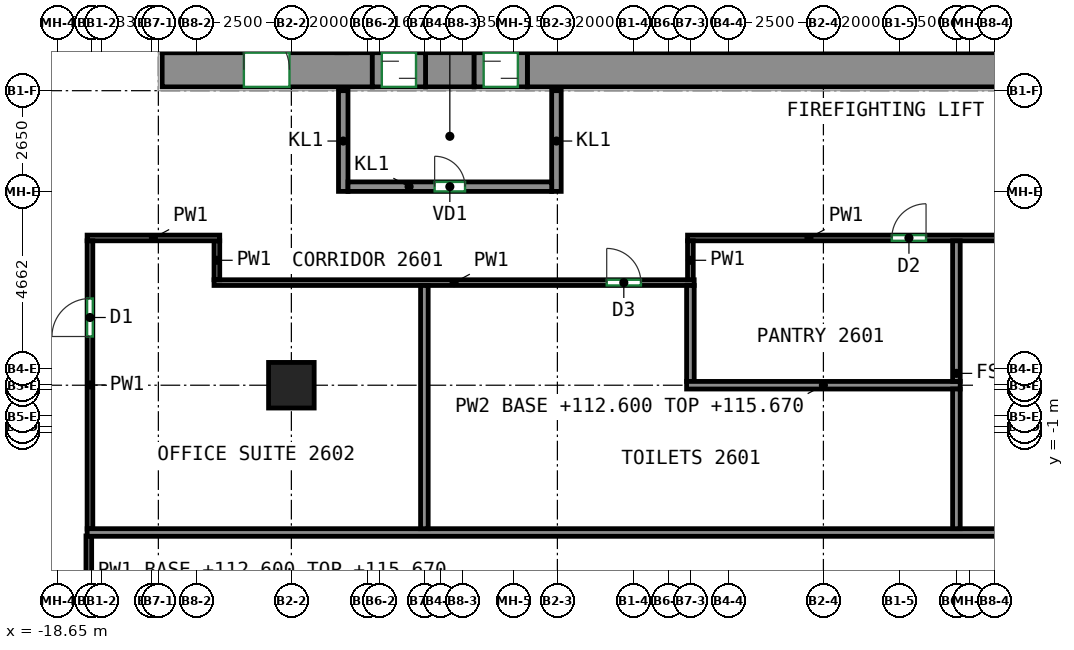
"""IFC4 building model, lengths in metres.
Left out: names, types, materials, properties, quantities, classifications, styles, units other than length and angle.
Written with IfcOpenShell. Run it as: python <this file> out.ifc"""

import sys

from ifc_helpers import new_model, si_unit, direction, frame, frame_2d, origin, origin_2d, place, context, subcontext, project, spatial, rectangle, extrude, source, transform, mapped, element, fill, save


model = new_model("IFC4")
c1 = context("Model", 3, precision=1e-05, world=origin(), true_north=direction((0.0, 1.0)))
c2 = subcontext(c1, "Body", "Model", "MODEL_VIEW")
j1 = project(units=[si_unit("LENGTHUNIT", "METRE"), si_unit("PLANEANGLEUNIT", "RADIAN")], contexts=[c1])
p1 = place(None, origin())
s1 = spatial("IfcSite", under=j1, at=p1, CompositionType="ELEMENT")
p2 = place(p1, origin())
s2 = spatial("IfcBuilding", under=s1, at=p2, CompositionType="ELEMENT")
p3 = place(p2, frame((0.0, 0.0, 112.6)))
s3 = spatial("IfcBuildingStorey", under=s2, at=p3, CompositionType="ELEMENT", Elevation=112.6)
m1 = source(origin(), c2, "Body", "SweptSolid", [
    extrude(rectangle(XDim=1.2, YDim=1.2, at=origin_2d()), origin(), (0.0, 0.0, 1.0), 3.72),
])
p4 = place(p3, frame((-12.5, 0.25, 0.0), z_axis=(0.0, 0.0, 1.0), x_axis=(1.0, 0.0, 0.0)))
e1 = element("IfcColumn", 1, at=p4, inside=s3, PredefinedType="COLUMN", context=c2, shape_type="MappedRepresentation", body=[
    mapped(m1, transform((0.0, 0.0, 0.0))),
])
m2 = source(origin(), c2, "Body", "SweptSolid", [
    extrude(rectangle(XDim=5.53, YDim=0.9, at=frame_2d((2.765, 0.0))), origin(), (0.0, 0.0, 1.0), 3.72),
])
p5 = place(p3, frame((-15.9, 8.55, 0.0), z_axis=(0.0, 0.0, 1.0), x_axis=(1.0, 0.0, 0.0)))
e2 = element("IfcWall", 2, at=p5, inside=s3, PredefinedType="SHEAR", context=c2, shape_type="MappedRepresentation", body=[
    mapped(m2, transform((0.0, 0.0, 0.0))),
])
p6 = place(p5, frame((2.15, 0.0, 0.0)))
e3 = element("IfcOpeningElement", 3, at=p6, cuts=e2, PredefinedType="OPENING", context=c2, shape_type="SweptSolid", body=[
    extrude(rectangle(XDim=1.2, YDim=2.1, at=frame_2d((0.6, 1.05))), frame((0.0, 0.46, 0.0), z_axis=(0.0, -1.0, 0.0), x_axis=(1.0, 0.0, 0.0)), (0.0, 0.0, 1.0), 0.92),
])
m3 = source(origin(), c2, "Body", "SweptSolid", [
    extrude(rectangle(XDim=1.28, YDim=0.9, at=frame_2d((0.64, 0.0))), origin(), (0.0, 0.0, 1.0), 3.72),
])
p7 = place(p3, frame((-8.97, 8.55, 0.0), z_axis=(0.0, 0.0, 1.0), x_axis=(1.0, 0.0, 0.0)))
e4 = element("IfcWall", 4, at=p7, inside=s3, PredefinedType="SHEAR", context=c2, shape_type="MappedRepresentation", body=[
    mapped(m3, transform((0.0, 0.0, 0.0))),
])
m4 = source(origin(), c2, "Body", "SweptSolid", [
    extrude(rectangle(XDim=14.18, YDim=0.9, at=frame_2d((7.09, 0.0))), origin(), (0.0, 0.0, 1.0), 3.72),
])
p8 = place(p3, frame((-6.29, 8.55, 0.0), z_axis=(0.0, 0.0, 1.0), x_axis=(1.0, 0.0, 0.0)))
e5 = element("IfcWall", 5, at=p8, inside=s3, PredefinedType="SHEAR", context=c2, shape_type="MappedRepresentation", body=[
    mapped(m4, transform((0.0, 0.0, 0.0))),
])
m5 = source(origin(), c2, "Body", "SweptSolid", [
    extrude(rectangle(XDim=2.65, YDim=0.25, at=frame_2d((1.325, 0.0))), origin(), (0.0, 0.0, 1.0), 3.72),
])
for number, where, z_axis, x_axis in (
    (6, (-11.135, 5.35, 0.0), (0.0, 0.0, 1.0), (0.0, 1.0, 0.0)),
    (7, (-5.525, 5.35, 0.0), (0.0, 0.0, 1.0), (0.0, 1.0, 0.0)),
):
    element("IfcWall", number, at=place(p3, frame(where, z_axis=z_axis, x_axis=x_axis)), inside=s3, PredefinedType="PARTITIONING", context=c2, shape_type="MappedRepresentation", body=[
        mapped(m5, transform((0.0, 0.0, 0.0))),
    ])
m6 = source(origin(), c2, "Body", "SweptSolid", [
    extrude(rectangle(XDim=5.36, YDim=0.25, at=frame_2d((2.68, 0.0))), origin(), (0.0, 0.0, 1.0), 3.72),
])
p9 = place(p3, frame((-11.01, 5.475, 0.0), z_axis=(0.0, 0.0, 1.0), x_axis=(1.0, 0.0, 0.0)))
e8 = element("IfcWall", 8, at=p9, inside=s3, PredefinedType="PARTITIONING", context=c2, shape_type="MappedRepresentation", body=[
    mapped(m6, transform((0.0, 0.0, 0.0))),
])
p10 = place(p9, frame((2.28, 0.0, 0.0)))
e9 = element("IfcOpeningElement", 9, at=p10, cuts=e8, PredefinedType="OPENING", context=c2, shape_type="SweptSolid", body=[
    extrude(rectangle(XDim=0.8, YDim=2.0, at=frame_2d((0.4, 1.0))), frame((0.0, 0.135, 0.0), z_axis=(0.0, -1.0, 0.0), x_axis=(1.0, 0.0, 0.0)), (0.0, 0.0, 1.0), 0.27),
])
m7 = source(origin(), c2, "Body", "SweptSolid", [
    extrude(rectangle(XDim=1.4, YDim=0.9, at=frame_2d((0.7, 0.0))), origin(), (0.0, 0.0, 1.0), 2.7),
])
p11 = place(p3, frame((-10.37, 8.55, 0.0), z_axis=(0.0, 0.0, 1.0), x_axis=(1.0, 0.0, 0.0)))
e10 = element("IfcWall", 10, at=p11, inside=s3, PredefinedType="PARTITIONING", context=c2, shape_type="MappedRepresentation", body=[
    mapped(m7, transform((0.0, 0.0, 0.0))),
])
p12 = place(p11, frame((0.25, 0.0, 0.0)))
e11 = element("IfcOpeningElement", 11, at=p12, cuts=e10, PredefinedType="OPENING", context=c2, shape_type="SweptSolid", body=[
    extrude(rectangle(XDim=0.9, YDim=2.1, at=frame_2d((0.45, 1.05))), frame((0.0, 0.46, 0.0), z_axis=(0.0, -1.0, 0.0), x_axis=(1.0, 0.0, 0.0)), (0.0, 0.0, 1.0), 0.92),
])
m8 = source(origin(), c2, "Body", "SweptSolid", [
    extrude(rectangle(XDim=1.4, YDim=0.9, at=frame_2d((0.7, 0.0))), origin(), (0.0, 0.0, 1.0), 2.7),
])
p13 = place(p3, frame((-7.69, 8.55, 0.0), z_axis=(0.0, 0.0, 1.0), x_axis=(1.0, 0.0, 0.0)))
e12 = element("IfcWall", 12, at=p13, inside=s3, PredefinedType="PARTITIONING", context=c2, shape_type="MappedRepresentation", body=[
    mapped(m8, transform((0.0, 0.0, 0.0))),
])
p14 = place(p13, frame((0.25, 0.0, 0.0)))
e13 = element("IfcOpeningElement", 13, at=p14, cuts=e12, PredefinedType="OPENING", context=c2, shape_type="SweptSolid", body=[
    extrude(rectangle(XDim=0.9, YDim=2.1, at=frame_2d((0.45, 1.05))), frame((0.0, 0.46, 0.0), z_axis=(0.0, -1.0, 0.0), x_axis=(1.0, 0.0, 0.0)), (0.0, 0.0, 1.0), 0.92),
])
p15 = place(p3, frame((-14.535, 2.95, 0.0), z_axis=(0.0, 0.0, 1.0), x_axis=(1.0, 0.0, 0.0)))
e14 = element("IfcWall", 14, at=p15, inside=s3, PredefinedType="PARTITIONING", context=c2, shape_type="SweptSolid", body=[
    extrude(rectangle(XDim=12.635, YDim=0.15, at=frame_2d((6.317, 0.0))), origin(), (0.0, 0.0, 1.0), 3.72),
])
p16 = place(p15, frame((10.333, 0.0, 0.0)))
e15 = element("IfcOpeningElement", 15, at=p16, cuts=e14, PredefinedType="OPENING", context=c2, shape_type="SweptSolid", body=[
    extrude(rectangle(XDim=0.9, YDim=2.1, at=frame_2d((0.45, 1.05))), frame((0.0, 0.085, 0.0), z_axis=(0.0, -1.0, 0.0), x_axis=(1.0, 0.0, 0.0)), (0.0, 0.0, 1.0), 0.17),
])
p17 = place(p3, frame((-14.46, 4.05, 0.0), z_axis=(0.0, 0.0, 1.0), x_axis=(0.0, -1.0, 0.0)))
e16 = element("IfcWall", 16, at=p17, inside=s3, PredefinedType="PARTITIONING", context=c2, shape_type="SweptSolid", body=[
    extrude(rectangle(XDim=1.025, YDim=0.15, at=frame_2d((0.513, 0.0))), origin(), (0.0, 0.0, 1.0), 3.72),
])
p18 = place(p3, frame((-17.875, 4.125, 0.0), z_axis=(0.0, 0.0, 1.0), x_axis=(1.0, 0.0, 0.0)))
e17 = element("IfcWall", 17, at=p18, inside=s3, PredefinedType="PARTITIONING", context=c2, shape_type="SweptSolid", body=[
    extrude(rectangle(XDim=3.49, YDim=0.15, at=frame_2d((1.745, 0.0))), origin(), (0.0, 0.0, 1.0), 3.72),
])
p19 = place(p3, frame((-17.8, -3.535, 0.0), z_axis=(0.0, 0.0, 1.0), x_axis=(0.0, 1.0, 0.0)))
e18 = element("IfcWall", 18, at=p19, inside=s3, PredefinedType="PARTITIONING", context=c2, shape_type="SweptSolid", body=[
    extrude(rectangle(XDim=7.585, YDim=0.15, at=frame_2d((3.792, 0.0))), origin(), (0.0, 0.0, 1.0), 3.72),
])
p20 = place(p19, frame((5.067, 0.0, 0.0)))
e19 = element("IfcOpeningElement", 19, at=p20, cuts=e18, PredefinedType="OPENING", context=c2, shape_type="SweptSolid", body=[
    extrude(rectangle(XDim=1.0, YDim=2.1, at=frame_2d((0.5, 1.05))), frame((0.0, 0.085, 0.0), z_axis=(0.0, -1.0, 0.0), x_axis=(1.0, 0.0, 0.0)), (0.0, 0.0, 1.0), 0.17),
])
p21 = place(p3, frame((-17.83, -15.675, 0.0), z_axis=(0.0, 0.0, 1.0), x_axis=(0.0, 1.0, 0.0)))
e20 = element("IfcWall", 20, at=p21, inside=s3, PredefinedType="PARTITIONING", context=c2, shape_type="SweptSolid", body=[
    extrude(rectangle(XDim=11.96, YDim=0.15, at=frame_2d((5.98, 0.0))), origin(), (0.0, 0.0, 1.0), 3.72),
])
p22 = place(p21, frame((8.249, 0.0, 0.0)))
e21 = element("IfcOpeningElement", 21, at=p22, cuts=e20, PredefinedType="OPENING", context=c2, shape_type="SweptSolid", body=[
    extrude(rectangle(XDim=1.8, YDim=2.1, at=frame_2d((0.9, 1.05))), frame((0.0, 0.085, 0.0), z_axis=(0.0, -1.0, 0.0), x_axis=(1.0, 0.0, 0.0)), (0.0, 0.0, 1.0), 0.17),
])
p23 = place(p3, frame((-2.075, 4.125, 0.0), z_axis=(0.0, 0.0, 1.0), x_axis=(1.0, 0.0, 0.0)))
e22 = element("IfcWall", 22, at=p23, inside=s3, PredefinedType="PARTITIONING", context=c2, shape_type="SweptSolid", body=[
    extrude(rectangle(XDim=10.65, YDim=0.15, at=frame_2d((5.325, 0.0))), origin(), (0.0, 0.0, 1.0), 3.72),
])
p24 = place(p23, frame((5.376, 0.0, 0.0)))
e23 = element("IfcOpeningElement", 23, at=p24, cuts=e22, PredefinedType="OPENING", context=c2, shape_type="SweptSolid", body=[
    extrude(rectangle(XDim=0.9, YDim=2.1, at=frame_2d((0.45, 1.05))), frame((0.0, 0.085, 0.0), z_axis=(0.0, -1.0, 0.0), x_axis=(1.0, 0.0, 0.0)), (0.0, 0.0, 1.0), 0.17),
])
p25 = place(p3, frame((-2.0, 3.025, 0.0), z_axis=(0.0, 0.0, 1.0), x_axis=(0.0, 1.0, 0.0)))
e24 = element("IfcWall", 24, at=p25, inside=s3, PredefinedType="PARTITIONING", context=c2, shape_type="SweptSolid", body=[
    extrude(rectangle(XDim=1.025, YDim=0.15, at=frame_2d((0.513, 0.0))), origin(), (0.0, 0.0, 1.0), 3.72),
])
p26 = place(p3, frame((-17.874, -3.625, 0.0), z_axis=(0.0, 0.0, 1.0), x_axis=(1.0, 0.0, 0.0)))
e25 = element("IfcWall", 25, at=p26, inside=s3, PredefinedType="PARTITIONING", context=c2, shape_type="SweptSolid", body=[
    extrude(rectangle(XDim=33.474, YDim=0.2, at=frame_2d((16.737, 0.0))), origin(), (0.0, 0.0, 1.0), 3.72),
])
p27 = place(p3, frame((-9.0, -3.525, 0.0), z_axis=(0.0, 0.0, 1.0), x_axis=(0.0, 1.0, 0.0)))
e26 = element("IfcWall", 26, at=p27, inside=s3, PredefinedType="PARTITIONING", context=c2, shape_type="SweptSolid", body=[
    extrude(rectangle(XDim=6.399, YDim=0.2, at=frame_2d((3.199, 0.0))), origin(), (0.0, 0.0, 1.0), 3.72),
])
p28 = place(p3, frame((-2.0, 0.35, 0.0), z_axis=(0.0, 0.0, 1.0), x_axis=(0.0, 1.0, 0.0)))
e27 = element("IfcWall", 27, at=p28, inside=s3, PredefinedType="PARTITIONING", context=c2, shape_type="SweptSolid", body=[
    extrude(rectangle(XDim=2.524, YDim=0.2, at=frame_2d((1.262, 0.0))), origin(), (0.0, 0.0, 1.0), 3.72),
])
p29 = place(p3, frame((-2.1, 0.25, 0.0), z_axis=(0.0, 0.0, 1.0), x_axis=(1.0, 0.0, 0.0)))
e28 = element("IfcWall", 28, at=p29, inside=s3, PredefinedType="PARTITIONING", context=c2, shape_type="SweptSolid", body=[
    extrude(rectangle(XDim=7.2, YDim=0.2, at=frame_2d((3.6, 0.0))), origin(), (0.0, 0.0, 1.0), 3.07),
])
p30 = place(p3, frame((5.0, -3.525, 0.0), z_axis=(0.0, 0.0, 1.0), x_axis=(0.0, 1.0, 0.0)))
e29 = element("IfcWall", 29, at=p30, inside=s3, PredefinedType="PARTITIONING", context=c2, shape_type="SweptSolid", body=[
    extrude(rectangle(XDim=3.675, YDim=0.2, at=frame_2d((1.837, 0.0))), origin(), (0.0, 0.0, 1.0), 3.72),
])
p31 = place(p3, frame((5.0, 0.35, 0.0), z_axis=(0.0, 0.0, 1.0), x_axis=(0.0, 1.0, 0.0)))
e30 = element("IfcWall", 30, at=p31, inside=s3, PredefinedType="PARTITIONING", context=c2, shape_type="SweptSolid", body=[
    extrude(rectangle(XDim=3.699, YDim=0.2, at=frame_2d((1.85, 0.0))), origin(), (0.0, 0.0, 1.0), 3.72),
])
p32 = place(p10, origin())
e31 = element("IfcDoor", 31, at=p32, inside=s3, OperationType="SINGLE_SWING_LEFT", PredefinedType="DOOR", context=c2, shape_type="SweptSolid", body=[
    extrude(rectangle(XDim=0.8, YDim=2.0, at=frame_2d((0.4, 1.0))), frame((0.0, 0.025, 0.0), z_axis=(0.0, -1.0, 0.0), x_axis=(1.0, 0.0, 0.0)), (0.0, 0.0, 1.0), 0.05),
])
fill(e9, e31)
p33 = place(p12, origin())
e32 = element("IfcDoor", 32, at=p33, inside=s3, OperationType="SLIDING_TO_LEFT", PredefinedType="DOOR", context=c2, shape_type="SweptSolid", body=[
    extrude(rectangle(XDim=0.9, YDim=2.1, at=frame_2d((0.45, 1.05))), frame((0.0, 0.355, 0.0), z_axis=(0.0, -1.0, 0.0), x_axis=(1.0, 0.0, 0.0)), (0.0, 0.0, 1.0), 0.05),
])
fill(e11, e32)
p34 = place(p14, origin())
e33 = element("IfcDoor", 33, at=p34, inside=s3, OperationType="SLIDING_TO_RIGHT", PredefinedType="DOOR", context=c2, shape_type="SweptSolid", body=[
    extrude(rectangle(XDim=0.9, YDim=2.1, at=frame_2d((0.45, 1.05))), frame((0.0, 0.355, 0.0), z_axis=(0.0, -1.0, 0.0), x_axis=(1.0, 0.0, 0.0)), (0.0, 0.0, 1.0), 0.05),
])
fill(e13, e33)
p35 = place(p6, origin())
e34 = element("IfcDoor", 34, at=p35, inside=s3, OperationType="DOUBLE_DOOR_SINGLE_SWING", PredefinedType="DOOR", context=c2, shape_type="SweptSolid", body=[
    extrude(rectangle(XDim=1.2, YDim=2.1, at=frame_2d((0.6, 1.05))), frame((0.0, 0.355, 0.0), z_axis=(0.0, -1.0, 0.0), x_axis=(1.0, 0.0, 0.0)), (0.0, 0.0, 1.0), 0.05),
])
fill(e3, e34)
p36 = place(p20, origin())
e35 = element("IfcDoor", 35, at=p36, inside=s3, OperationType="SINGLE_SWING_LEFT", PredefinedType="DOOR", context=c2, shape_type="SweptSolid", body=[
    extrude(rectangle(XDim=1.0, YDim=2.1, at=frame_2d((0.5, 1.05))), frame((0.0, 0.025, 0.0), z_axis=(0.0, -1.0, 0.0), x_axis=(1.0, 0.0, 0.0)), (0.0, 0.0, 1.0), 0.05),
])
fill(e19, e35)
p37 = place(p16, origin())
e36 = element("IfcDoor", 36, at=p37, inside=s3, OperationType="SINGLE_SWING_LEFT", PredefinedType="DOOR", context=c2, shape_type="SweptSolid", body=[
    extrude(rectangle(XDim=0.9, YDim=2.1, at=frame_2d((0.45, 1.05))), frame((0.0, 0.025, 0.0), z_axis=(0.0, -1.0, 0.0), x_axis=(1.0, 0.0, 0.0)), (0.0, 0.0, 1.0), 0.05),
])
fill(e15, e36)
p38 = place(p24, origin())
e37 = element("IfcDoor", 37, at=p38, inside=s3, OperationType="SINGLE_SWING_RIGHT", PredefinedType="DOOR", context=c2, shape_type="SweptSolid", body=[
    extrude(rectangle(XDim=0.9, YDim=2.1, at=frame_2d((0.45, 1.05))), frame((0.0, 0.025, 0.0), z_axis=(0.0, -1.0, 0.0), x_axis=(1.0, 0.0, 0.0)), (0.0, 0.0, 1.0), 0.05),
])
fill(e23, e37)
save(model, sys.argv[1])
